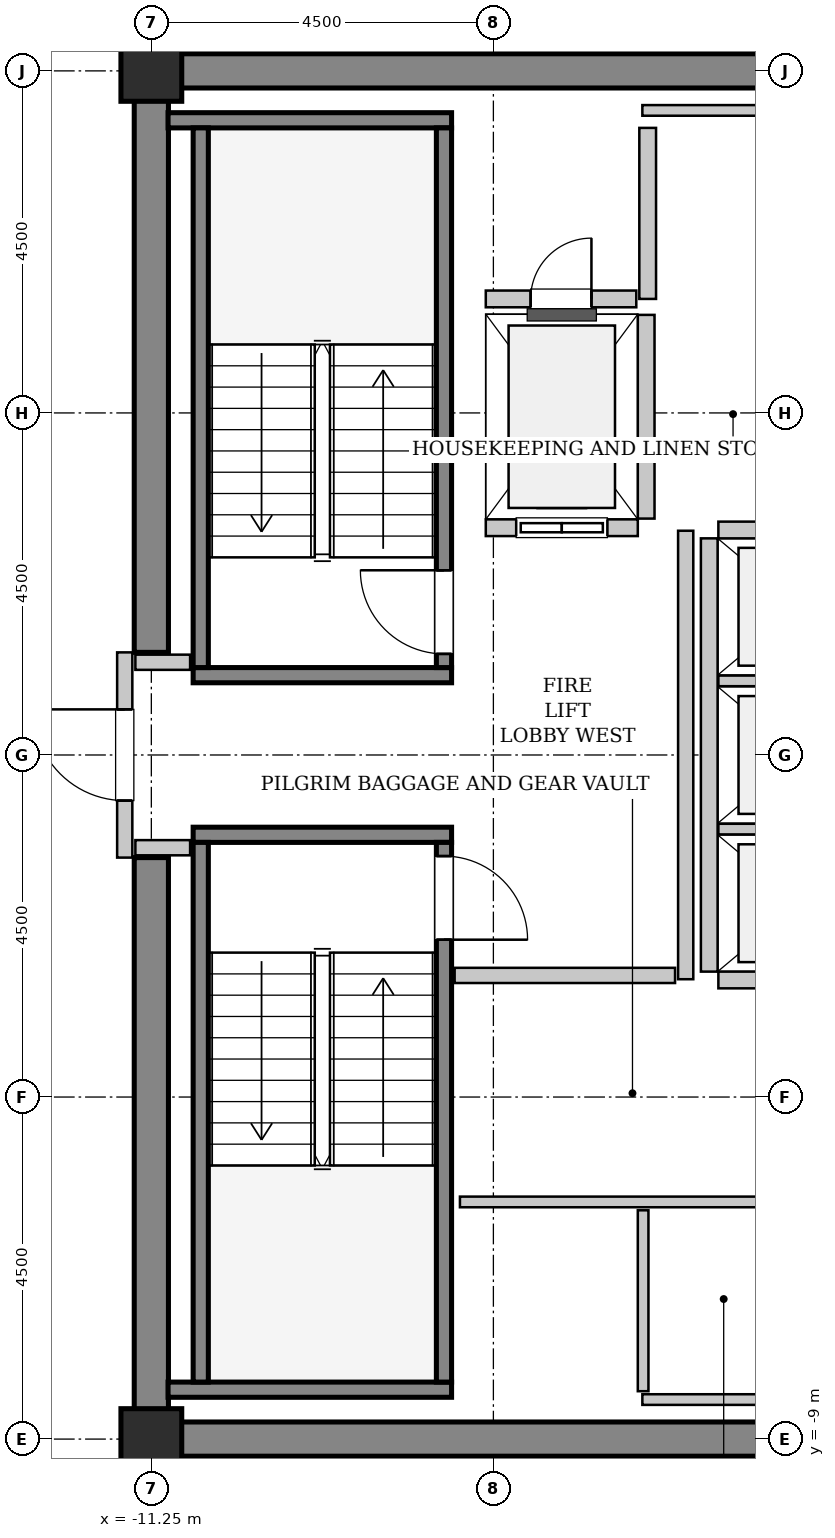
"""IFC4 building model, lengths in metres.
Left out: names, types, materials, properties, quantities, classifications, styles, units other than length and angle.
Written with IfcOpenShell. Run it as: python <this file> out.ifc"""

import sys

from ifc_helpers import new_model, si_unit, direction, frame, frame_2d, origin, origin_2d, place, context, subcontext, project, spatial, rectangle, hollow_rectangle, extrude, source, transform, mapped, element, fill, save


model = new_model("IFC4")
c1 = context("Model", 3, precision=1e-05, world=origin(), true_north=direction((0.0, 1.0)))
c2 = subcontext(c1, "Body", "Model", "MODEL_VIEW")
j1 = project(units=[si_unit("LENGTHUNIT", "METRE"), si_unit("PLANEANGLEUNIT", "RADIAN")], contexts=[c1])
p1 = place(None, origin())
s1 = spatial("IfcSite", under=j1, at=p1, CompositionType="ELEMENT")
p2 = place(p1, origin())
s2 = spatial("IfcBuilding", under=s1, at=p2, CompositionType="ELEMENT")
p3 = place(p2, frame((0.0, 0.0, 272.2)))
s3 = spatial("IfcBuildingStorey", under=s2, at=p3, CompositionType="ELEMENT", Elevation=272.2)
m1 = source(origin(), c2, "Body", "SweptSolid", [
    extrude(rectangle(XDim=9.925, YDim=0.45, at=frame_2d((4.962, 0.0))), origin(), (0.0, 0.0, 1.0), 3.8),
])
for number, where, z_axis, x_axis in (
    (1, (-11.475, 9.0, 0.0), (0.0, 0.0, 1.0), (1.0, 0.0, 0.0)),
    (2, (-11.475, -9.0, 0.0), (0.0, 0.0, 1.0), (1.0, 0.0, 0.0)),
):
    element("IfcWall", number, at=place(p3, frame(where, z_axis=z_axis, x_axis=x_axis)), inside=s3, PredefinedType="SHEAR", context=c2, shape_type="MappedRepresentation", body=[
        mapped(m1, transform((0.0, 0.0, 0.0), x_axis=(1.0, 0.0, 0.0), y_axis=(0.0, 1.0, 0.0), z_axis=(0.0, 0.0, 1.0), scale=1.0)),
    ])
m2 = source(origin(), c2, "Body", "SweptSolid", [
    extrude(rectangle(XDim=7.425, YDim=0.45, at=frame_2d((3.712, 0.0))), origin(), (0.0, 0.0, 1.0), 3.8),
])
for number, where, z_axis, x_axis in (
    (3, (-11.25, -8.775, 0.0), (0.0, 0.0, 1.0), (0.0, 1.0, 0.0)),
    (4, (-11.25, 1.35, 0.0), (0.0, 0.0, 1.0), (0.0, 1.0, 0.0)),
):
    element("IfcWall", number, at=place(p3, frame(where, z_axis=z_axis, x_axis=x_axis)), inside=s3, PredefinedType="SHEAR", context=c2, shape_type="MappedRepresentation", body=[
        mapped(m2, transform((0.0, 0.0, 0.0), x_axis=(1.0, 0.0, 0.0), y_axis=(0.0, 1.0, 0.0), z_axis=(0.0, 0.0, 1.0), scale=1.0)),
    ])
m3 = source(origin(), c2, "Body", "SweptSolid", [
    extrude(hollow_rectangle(XDim=0.8, YDim=0.8, WallThickness=0.04, InnerFilletRadius=0.04, OuterFilletRadius=0.08, at=origin_2d()), origin(), (0.0, 0.0, 1.0), 3.8),
])
for number, where, z_axis, x_axis in (
    (5, (-11.25, -9.0, 0.0), (0.0, 0.0, 1.0), (1.0, 0.0, 0.0)),
    (6, (-11.25, 9.0, 0.0), (0.0, 0.0, 1.0), (1.0, 0.0, 0.0)),
):
    element("IfcColumn", number, at=place(p3, frame(where, z_axis=z_axis, x_axis=x_axis)), inside=s3, PredefinedType="COLUMN", context=c2, shape_type="MappedRepresentation", body=[
        mapped(m3, transform((0.0, 0.0, 0.0), x_axis=(1.0, 0.0, 0.0), y_axis=(0.0, 1.0, 0.0), z_axis=(0.0, 0.0, 1.0), scale=1.0)),
    ])
m4 = source(origin(), c2, "Body", "SweptSolid", [
    extrude(rectangle(XDim=3.4, YDim=0.2, at=frame_2d((1.7, 0.0))), origin(), (0.0, 0.0, 1.0), 3.8),
])
p4 = place(p3, frame((-7.3, 1.05, 0.0), z_axis=(0.0, 0.0, 1.0), x_axis=(-1.0, 0.0, 0.0)))
e7 = element("IfcWall", 7, at=p4, inside=s3, PredefinedType="SOLIDWALL", context=c2, shape_type="MappedRepresentation", body=[
    mapped(m4, transform((0.0, 0.0, 0.0), x_axis=(1.0, 0.0, 0.0), y_axis=(0.0, 1.0, 0.0), z_axis=(0.0, 0.0, 1.0), scale=1.0)),
])
m5 = source(origin(), c2, "Body", "SweptSolid", [
    extrude(rectangle(XDim=3.73, YDim=0.2, at=frame_2d((1.865, 0.0))), origin(), (0.0, 0.0, 1.0), 3.8),
])
p5 = place(p3, frame((-7.3, 8.35, 0.0), z_axis=(0.0, 0.0, 1.0), x_axis=(-1.0, 0.0, 0.0)))
e8 = element("IfcWall", 8, at=p5, inside=s3, PredefinedType="SOLIDWALL", context=c2, shape_type="MappedRepresentation", body=[
    mapped(m5, transform((0.0, 0.0, 0.0), x_axis=(1.0, 0.0, 0.0), y_axis=(0.0, 1.0, 0.0), z_axis=(0.0, 0.0, 1.0), scale=1.0)),
])
m6 = source(origin(), c2, "Body", "SweptSolid", [
    extrude(rectangle(XDim=7.1, YDim=0.2, at=frame_2d((3.55, 0.0))), origin(), (0.0, 0.0, 1.0), 3.8),
])
p6 = place(p3, frame((-7.4, 1.15, 0.0), z_axis=(0.0, 0.0, 1.0), x_axis=(0.0, 1.0, 0.0)))
e9 = element("IfcWall", 9, at=p6, inside=s3, PredefinedType="SOLIDWALL", context=c2, shape_type="MappedRepresentation", body=[
    mapped(m6, transform((0.0, 0.0, 0.0), x_axis=(1.0, 0.0, 0.0), y_axis=(0.0, 1.0, 0.0), z_axis=(0.0, 0.0, 1.0), scale=1.0)),
])
p7 = place(p6, frame((0.18, 0.0, 0.0)))
e10 = element("IfcOpeningElement", 10, at=p7, cuts=e9, PredefinedType="OPENING", context=c2, shape_type="SweptSolid", body=[
    extrude(rectangle(XDim=1.1, YDim=2.15, at=frame_2d((0.55, 1.075))), frame((0.0, 0.11, 0.0), z_axis=(0.0, -1.0, 0.0), x_axis=(1.0, 0.0, 0.0)), (0.0, 0.0, 1.0), 0.22),
])
p8 = place(p3, frame((-10.6, 1.15, 0.0), z_axis=(0.0, 0.0, 1.0), x_axis=(0.0, 1.0, 0.0)))
e11 = element("IfcWall", 11, at=p8, inside=s3, PredefinedType="SOLIDWALL", context=c2, shape_type="MappedRepresentation", body=[
    mapped(m6, transform((0.0, 0.0, 0.0), x_axis=(1.0, 0.0, 0.0), y_axis=(0.0, 1.0, 0.0), z_axis=(0.0, 0.0, 1.0), scale=1.0)),
])
p9 = place(p3, frame((-10.7, -1.05, 0.0), z_axis=(0.0, 0.0, 1.0), x_axis=(1.0, 0.0, 0.0)))
e12 = element("IfcWall", 12, at=p9, inside=s3, PredefinedType="SOLIDWALL", context=c2, shape_type="MappedRepresentation", body=[
    mapped(m4, transform((0.0, 0.0, 0.0), x_axis=(1.0, 0.0, 0.0), y_axis=(0.0, 1.0, 0.0), z_axis=(0.0, 0.0, 1.0), scale=1.0)),
])
p10 = place(p3, frame((-11.03, -8.35, 0.0), z_axis=(0.0, 0.0, 1.0), x_axis=(1.0, 0.0, 0.0)))
e13 = element("IfcWall", 13, at=p10, inside=s3, PredefinedType="SOLIDWALL", context=c2, shape_type="MappedRepresentation", body=[
    mapped(m5, transform((0.0, 0.0, 0.0), x_axis=(1.0, 0.0, 0.0), y_axis=(0.0, 1.0, 0.0), z_axis=(0.0, 0.0, 1.0), scale=1.0)),
])
p11 = place(p3, frame((-10.6, -1.15, 0.0), z_axis=(0.0, 0.0, 1.0), x_axis=(0.0, -1.0, 0.0)))
e14 = element("IfcWall", 14, at=p11, inside=s3, PredefinedType="SOLIDWALL", context=c2, shape_type="MappedRepresentation", body=[
    mapped(m6, transform((0.0, 0.0, 0.0), x_axis=(1.0, 0.0, 0.0), y_axis=(0.0, 1.0, 0.0), z_axis=(0.0, 0.0, 1.0), scale=1.0)),
])
p12 = place(p3, frame((-7.4, -1.15, 0.0), z_axis=(0.0, 0.0, 1.0), x_axis=(0.0, -1.0, 0.0)))
e15 = element("IfcWall", 15, at=p12, inside=s3, PredefinedType="SOLIDWALL", context=c2, shape_type="MappedRepresentation", body=[
    mapped(m6, transform((0.0, 0.0, 0.0), x_axis=(1.0, 0.0, 0.0), y_axis=(0.0, 1.0, 0.0), z_axis=(0.0, 0.0, 1.0), scale=1.0)),
])
p13 = place(p12, frame((0.18, 0.0, 0.0)))
e16 = element("IfcOpeningElement", 16, at=p13, cuts=e15, PredefinedType="OPENING", context=c2, shape_type="SweptSolid", body=[
    extrude(rectangle(XDim=1.1, YDim=2.15, at=frame_2d((0.55, 1.075))), frame((0.0, 0.11, 0.0), z_axis=(0.0, -1.0, 0.0), x_axis=(1.0, 0.0, 0.0)), (0.0, 0.0, 1.0), 0.22),
])
m7 = source(origin(), c2, "Body", "SweptSolid", [
    extrude(rectangle(XDim=2.0, YDim=0.22, at=frame_2d((1.0, 0.0))), origin(), (0.0, 0.0, 1.0), 3.535),
])
p14 = place(p3, frame((-6.85, 2.99, 0.0), z_axis=(0.0, 0.0, 1.0), x_axis=(1.0, 0.0, 0.0)))
e17 = element("IfcWall", 17, at=p14, inside=s3, PredefinedType="SOLIDWALL", context=c2, shape_type="MappedRepresentation", body=[
    mapped(m7, transform((0.0, 0.0, 0.0), x_axis=(1.0, 0.0, 0.0), y_axis=(0.0, 1.0, 0.0), z_axis=(0.0, 0.0, 1.0), scale=1.0)),
])
p15 = place(p14, frame((0.4, 0.0, 0.0)))
e18 = element("IfcOpeningElement", 18, at=p15, cuts=e17, PredefinedType="OPENING", context=c2, shape_type="SweptSolid", body=[
    extrude(rectangle(XDim=1.2, YDim=2.2, at=frame_2d((0.6, 1.1))), frame((0.0, 0.12, 0.0), z_axis=(0.0, -1.0, 0.0), x_axis=(1.0, 0.0, 0.0)), (0.0, 0.0, 1.0), 0.24),
])
m8 = source(origin(), c2, "Body", "SweptSolid", [
    extrude(rectangle(XDim=2.68, YDim=0.22, at=frame_2d((1.34, 0.0))), origin(), (0.0, 0.0, 1.0), 3.535),
])
p16 = place(p3, frame((-4.74, 3.11, 0.0), z_axis=(0.0, 0.0, 1.0), x_axis=(0.0, 1.0, 0.0)))
e19 = element("IfcWall", 19, at=p16, inside=s3, PredefinedType="SOLIDWALL", context=c2, shape_type="MappedRepresentation", body=[
    mapped(m8, transform((0.0, 0.0, 0.0), x_axis=(1.0, 0.0, 0.0), y_axis=(0.0, 1.0, 0.0), z_axis=(0.0, 0.0, 1.0), scale=1.0)),
])
m9 = source(origin(), c2, "Body", "SweptSolid", [
    extrude(rectangle(XDim=5.7, YDim=0.22, at=frame_2d((2.85, 0.0))), origin(), (0.0, 0.0, 1.0), 3.535),
])
p17 = place(p3, frame((-3.91, 2.85, 0.0), z_axis=(0.0, 0.0, 1.0), x_axis=(0.0, -1.0, 0.0)))
e20 = element("IfcWall", 20, at=p17, inside=s3, PredefinedType="SOLIDWALL", context=c2, shape_type="MappedRepresentation", body=[
    mapped(m9, transform((0.0, 0.0, 0.0), x_axis=(1.0, 0.0, 0.0), y_axis=(0.0, 1.0, 0.0), z_axis=(0.0, 0.0, 1.0), scale=1.0)),
])
m10 = source(origin(), c2, "Body", "SweptSolid", [
    extrude(rectangle(XDim=2.13, YDim=0.22, at=frame_2d((1.065, 0.0))), origin(), (0.0, 0.0, 1.0), 3.535),
])
p18 = place(p3, frame((-3.79, -2.96, 0.0), z_axis=(0.0, 0.0, 1.0), x_axis=(1.0, 0.0, 0.0)))
e21 = element("IfcWall", 21, at=p18, inside=s3, PredefinedType="SOLIDWALL", context=c2, shape_type="MappedRepresentation", body=[
    mapped(m10, transform((0.0, 0.0, 0.0), x_axis=(1.0, 0.0, 0.0), y_axis=(0.0, 1.0, 0.0), z_axis=(0.0, 0.0, 1.0), scale=1.0)),
])
m11 = source(origin(), c2, "Body", "SweptSolid", [
    extrude(rectangle(XDim=2.13, YDim=0.14, at=frame_2d((1.065, 0.0))), origin(), (0.0, 0.0, 1.0), 3.535),
])
for number, where, z_axis, x_axis in (
    (22, (-3.79, -0.975, 0.0), (0.0, 0.0, 1.0), (1.0, 0.0, 0.0)),
    (23, (-3.79, 0.975, 0.0), (0.0, 0.0, 1.0), (1.0, 0.0, 0.0)),
):
    element("IfcWall", number, at=place(p3, frame(where, z_axis=z_axis, x_axis=x_axis)), inside=s3, PredefinedType="PARTITIONING", context=c2, shape_type="MappedRepresentation", body=[
        mapped(m11, transform((0.0, 0.0, 0.0), x_axis=(1.0, 0.0, 0.0), y_axis=(0.0, 1.0, 0.0), z_axis=(0.0, 0.0, 1.0), scale=1.0)),
    ])
p19 = place(p3, frame((-1.66, 2.96, 0.0), z_axis=(0.0, 0.0, 1.0), x_axis=(-1.0, 0.0, 0.0)))
e24 = element("IfcWall", 24, at=p19, inside=s3, PredefinedType="SOLIDWALL", context=c2, shape_type="MappedRepresentation", body=[
    mapped(m10, transform((0.0, 0.0, 0.0), x_axis=(1.0, 0.0, 0.0), y_axis=(0.0, 1.0, 0.0), z_axis=(0.0, 0.0, 1.0), scale=1.0)),
])
m12 = source(origin(), c2, "Body", "SweptSolid", [
    extrude(rectangle(XDim=2.25, YDim=0.22, at=frame_2d((1.125, 0.0))), origin(), (0.0, 0.0, 1.0), 3.535),
])
p20 = place(p3, frame((-4.72, 6.0, 0.0), z_axis=(0.0, 0.0, 1.0), x_axis=(0.0, 1.0, 0.0)))
e25 = element("IfcWall", 25, at=p20, inside=s3, PredefinedType="SOLIDWALL", context=c2, shape_type="MappedRepresentation", body=[
    mapped(m12, transform((0.0, 0.0, 0.0), x_axis=(1.0, 0.0, 0.0), y_axis=(0.0, 1.0, 0.0), z_axis=(0.0, 0.0, 1.0), scale=1.0)),
])
m13 = source(origin(), c2, "Body", "SweptSolid", [
    extrude(rectangle(XDim=1.98, YDim=0.22, at=frame_2d((0.99, 0.0))), origin(), (0.0, 0.0, 1.0), 3.535),
])
p21 = place(p3, frame((-6.85, 6.0, 0.0), z_axis=(0.0, 0.0, 1.0), x_axis=(1.0, 0.0, 0.0)))
e26 = element("IfcWall", 26, at=p21, inside=s3, PredefinedType="SOLIDWALL", context=c2, shape_type="MappedRepresentation", body=[
    mapped(m13, transform((0.0, 0.0, 0.0), x_axis=(1.0, 0.0, 0.0), y_axis=(0.0, 1.0, 0.0), z_axis=(0.0, 0.0, 1.0), scale=1.0)),
])
p22 = place(p21, frame((0.59, 0.0, 0.0)))
e27 = element("IfcOpeningElement", 27, at=p22, cuts=e26, PredefinedType="OPENING", context=c2, shape_type="SweptSolid", body=[
    extrude(rectangle(XDim=0.8, YDim=2.0, at=frame_2d((0.4, 1.0))), frame((0.0, 0.12, 0.0), z_axis=(0.0, -1.0, 0.0), x_axis=(1.0, 0.0, 0.0)), (0.0, 0.0, 1.0), 0.24),
])
m14 = source(origin(), c2, "Body", "SweptSolid", [
    extrude(rectangle(XDim=2.7, YDim=0.2, at=frame_2d((1.35, 0.0))), origin(), (0.0, 0.0, 1.0), 2.625),
])
p23 = place(p3, frame((-11.6, -1.35, 0.0), z_axis=(0.0, 0.0, 1.0), x_axis=(0.0, 1.0, 0.0)))
e28 = element("IfcWall", 28, at=p23, inside=s3, PredefinedType="PARTITIONING", context=c2, shape_type="MappedRepresentation", body=[
    mapped(m14, transform((0.0, 0.0, 0.0), x_axis=(1.0, 0.0, 0.0), y_axis=(0.0, 1.0, 0.0), z_axis=(0.0, 0.0, 1.0), scale=1.0)),
])
p24 = place(p23, frame((0.75, 0.0, 0.0)))
e29 = element("IfcOpeningElement", 29, at=p24, cuts=e28, PredefinedType="OPENING", context=c2, shape_type="SweptSolid", body=[
    extrude(rectangle(XDim=1.2, YDim=2.15, at=frame_2d((0.6, 1.075))), frame((0.0, 0.11, 0.0), z_axis=(0.0, -1.0, 0.0), x_axis=(1.0, 0.0, 0.0)), (0.0, 0.0, 1.0), 0.22),
])
m15 = source(origin(), c2, "Body", "SweptSolid", [
    extrude(rectangle(XDim=5.9, YDim=0.2, at=frame_2d((2.95, 0.0))), origin(), (0.0, 0.0, 1.0), 3.535),
])
p25 = place(p3, frame((-4.22, -2.95, 0.0), z_axis=(0.0, 0.0, 1.0), x_axis=(0.0, 1.0, 0.0)))
e30 = element("IfcWall", 30, at=p25, inside=s3, PredefinedType="PARTITIONING", context=c2, shape_type="MappedRepresentation", body=[
    mapped(m15, transform((0.0, 0.0, 0.0), x_axis=(1.0, 0.0, 0.0), y_axis=(0.0, 1.0, 0.0), z_axis=(0.0, 0.0, 1.0), scale=1.0)),
])
m16 = source(origin(), c2, "Body", "SweptSolid", [
    extrude(rectangle(XDim=2.9, YDim=0.2, at=frame_2d((1.45, 0.0))), origin(), (0.0, 0.0, 1.0), 3.535),
])
p26 = place(p3, frame((-7.26, -2.9, 0.0), z_axis=(0.0, 0.0, 1.0), x_axis=(1.0, 0.0, 0.0)))
e31 = element("IfcWall", 31, at=p26, inside=s3, PredefinedType="PARTITIONING", context=c2, shape_type="MappedRepresentation", body=[
    mapped(m16, transform((0.0, 0.0, 0.0), x_axis=(1.0, 0.0, 0.0), y_axis=(0.0, 1.0, 0.0), z_axis=(0.0, 0.0, 1.0), scale=1.0)),
])
m17 = source(origin(), c2, "Body", "SweptSolid", [
    extrude(rectangle(XDim=0.72, YDim=0.2, at=frame_2d((0.36, 0.0))), origin(), (0.0, 0.0, 1.0), 3.535),
])
for number, where, z_axis, x_axis in (
    (32, (-11.46, 1.22, 0.0), (0.0, 0.0, 1.0), (1.0, 0.0, 0.0)),
    (33, (-11.46, -1.22, 0.0), (0.0, 0.0, 1.0), (1.0, 0.0, 0.0)),
):
    element("IfcWall", number, at=place(p3, frame(where, z_axis=z_axis, x_axis=x_axis)), inside=s3, PredefinedType="PARTITIONING", context=c2, shape_type="MappedRepresentation", body=[
        mapped(m17, transform((0.0, 0.0, 0.0), x_axis=(1.0, 0.0, 0.0), y_axis=(0.0, 1.0, 0.0), z_axis=(0.0, 0.0, 1.0), scale=1.0)),
    ])
m18 = source(origin(), c2, "Body", "SweptSolid", [
    extrude(rectangle(XDim=3.15, YDim=0.14, at=frame_2d((1.575, 0.0))), origin(), (0.0, 0.0, 1.0), 3.535),
])
p27 = place(p3, frame((-4.79, 8.48, 0.0), z_axis=(0.0, 0.0, 1.0), x_axis=(1.0, 0.0, 0.0)))
e34 = element("IfcWall", 34, at=p27, inside=s3, PredefinedType="PARTITIONING", context=c2, shape_type="MappedRepresentation", body=[
    mapped(m18, transform((0.0, 0.0, 0.0), x_axis=(1.0, 0.0, 0.0), y_axis=(0.0, 1.0, 0.0), z_axis=(0.0, 0.0, 1.0), scale=1.0)),
])
m19 = source(origin(), c2, "Body", "SweptSolid", [
    extrude(rectangle(XDim=5.55, YDim=0.14, at=frame_2d((2.775, 0.0))), origin(), (0.0, 0.0, 1.0), 3.535),
])
p28 = place(p3, frame((-7.19, -5.88, 0.0), z_axis=(0.0, 0.0, 1.0), x_axis=(1.0, 0.0, 0.0)))
e35 = element("IfcWall", 35, at=p28, inside=s3, PredefinedType="PARTITIONING", context=c2, shape_type="MappedRepresentation", body=[
    mapped(m19, transform((0.0, 0.0, 0.0), x_axis=(1.0, 0.0, 0.0), y_axis=(0.0, 1.0, 0.0), z_axis=(0.0, 0.0, 1.0), scale=1.0)),
])
p29 = place(p3, frame((-4.79, -8.48, 0.0), z_axis=(0.0, 0.0, 1.0), x_axis=(1.0, 0.0, 0.0)))
e36 = element("IfcWall", 36, at=p29, inside=s3, PredefinedType="PARTITIONING", context=c2, shape_type="MappedRepresentation", body=[
    mapped(m18, transform((0.0, 0.0, 0.0), x_axis=(1.0, 0.0, 0.0), y_axis=(0.0, 1.0, 0.0), z_axis=(0.0, 0.0, 1.0), scale=1.0)),
])
m20 = source(origin(), c2, "Body", "SweptSolid", [
    extrude(rectangle(XDim=2.38, YDim=0.14, at=frame_2d((1.19, 0.0))), origin(), (0.0, 0.0, 1.0), 3.535),
])
p30 = place(p3, frame((-4.78, -8.37, 0.0), z_axis=(0.0, 0.0, 1.0), x_axis=(0.0, 1.0, 0.0)))
e37 = element("IfcWall", 37, at=p30, inside=s3, PredefinedType="PARTITIONING", context=c2, shape_type="MappedRepresentation", body=[
    mapped(m20, transform((0.0, 0.0, 0.0), x_axis=(1.0, 0.0, 0.0), y_axis=(0.0, 1.0, 0.0), z_axis=(0.0, 0.0, 1.0), scale=1.0)),
])
m21 = source(origin(), c2, "Body", "SweptSolid", [
    extrude(rectangle(XDim=1.1, YDim=2.15, at=frame_2d((0.55, 1.075))), frame((0.0, 0.025, 0.0), z_axis=(0.0, -1.0, 0.0), x_axis=(1.0, 0.0, 0.0)), (0.0, 0.0, 1.0), 0.05),
])
p31 = place(p7, origin())
e38 = element("IfcDoor", 38, at=p31, inside=s3, OperationType="SINGLE_SWING_RIGHT", PredefinedType="DOOR", context=c2, shape_type="MappedRepresentation", body=[
    mapped(m21, transform((0.0, 0.0, 0.0), x_axis=(1.0, 0.0, 0.0), y_axis=(0.0, 1.0, 0.0), z_axis=(0.0, 0.0, 1.0), scale=1.0)),
])
fill(e10, e38)
p32 = place(p13, origin())
e39 = element("IfcDoor", 39, at=p32, inside=s3, OperationType="SINGLE_SWING_RIGHT", PredefinedType="DOOR", context=c2, shape_type="MappedRepresentation", body=[
    mapped(m21, transform((0.0, 0.0, 0.0), x_axis=(1.0, 0.0, 0.0), y_axis=(0.0, 1.0, 0.0), z_axis=(0.0, 0.0, 1.0), scale=1.0)),
])
fill(e16, e39)
m22 = source(origin(), c2, "Body", "SweptSolid", [
    extrude(rectangle(XDim=1.2, YDim=2.2, at=frame_2d((0.6, 1.1))), frame((0.0, 0.025, 0.0), z_axis=(0.0, -1.0, 0.0), x_axis=(1.0, 0.0, 0.0)), (0.0, 0.0, 1.0), 0.05),
])
p33 = place(p15, origin())
e40 = element("IfcDoor", 40, at=p33, inside=s3, OperationType="SLIDING_TO_LEFT", PredefinedType="DOOR", context=c2, shape_type="MappedRepresentation", body=[
    mapped(m22, transform((0.0, 0.0, 0.0), x_axis=(1.0, 0.0, 0.0), y_axis=(0.0, 1.0, 0.0), z_axis=(0.0, 0.0, 1.0), scale=1.0)),
])
fill(e18, e40)
m23 = source(origin(), c2, "Body", "SweptSolid", [
    extrude(rectangle(XDim=0.8, YDim=2.0, at=frame_2d((0.4, 1.0))), frame((0.0, 0.025, 0.0), z_axis=(0.0, -1.0, 0.0), x_axis=(1.0, 0.0, 0.0)), (0.0, 0.0, 1.0), 0.05),
])
p34 = place(p22, origin())
e41 = element("IfcDoor", 41, at=p34, inside=s3, OperationType="SINGLE_SWING_RIGHT", PredefinedType="TRAPDOOR", context=c2, shape_type="MappedRepresentation", body=[
    mapped(m23, transform((0.0, 0.0, 0.0), x_axis=(1.0, 0.0, 0.0), y_axis=(0.0, 1.0, 0.0), z_axis=(0.0, 0.0, 1.0), scale=1.0)),
])
fill(e27, e41)
m24 = source(origin(), c2, "Body", "SweptSolid", [
    extrude(rectangle(XDim=1.2, YDim=2.15, at=frame_2d((0.6, 1.075))), frame((0.0, 0.025, 0.0), z_axis=(0.0, -1.0, 0.0), x_axis=(1.0, 0.0, 0.0)), (0.0, 0.0, 1.0), 0.05),
])
p35 = place(p24, origin())
e42 = element("IfcDoor", 42, at=p35, inside=s3, OperationType="SINGLE_SWING_RIGHT", PredefinedType="DOOR", context=c2, shape_type="MappedRepresentation", body=[
    mapped(m24, transform((0.0, 0.0, 0.0), x_axis=(1.0, 0.0, 0.0), y_axis=(0.0, 1.0, 0.0), z_axis=(0.0, 0.0, 1.0), scale=1.0)),
])
fill(e29, e42)
save(model, sys.argv[1])
